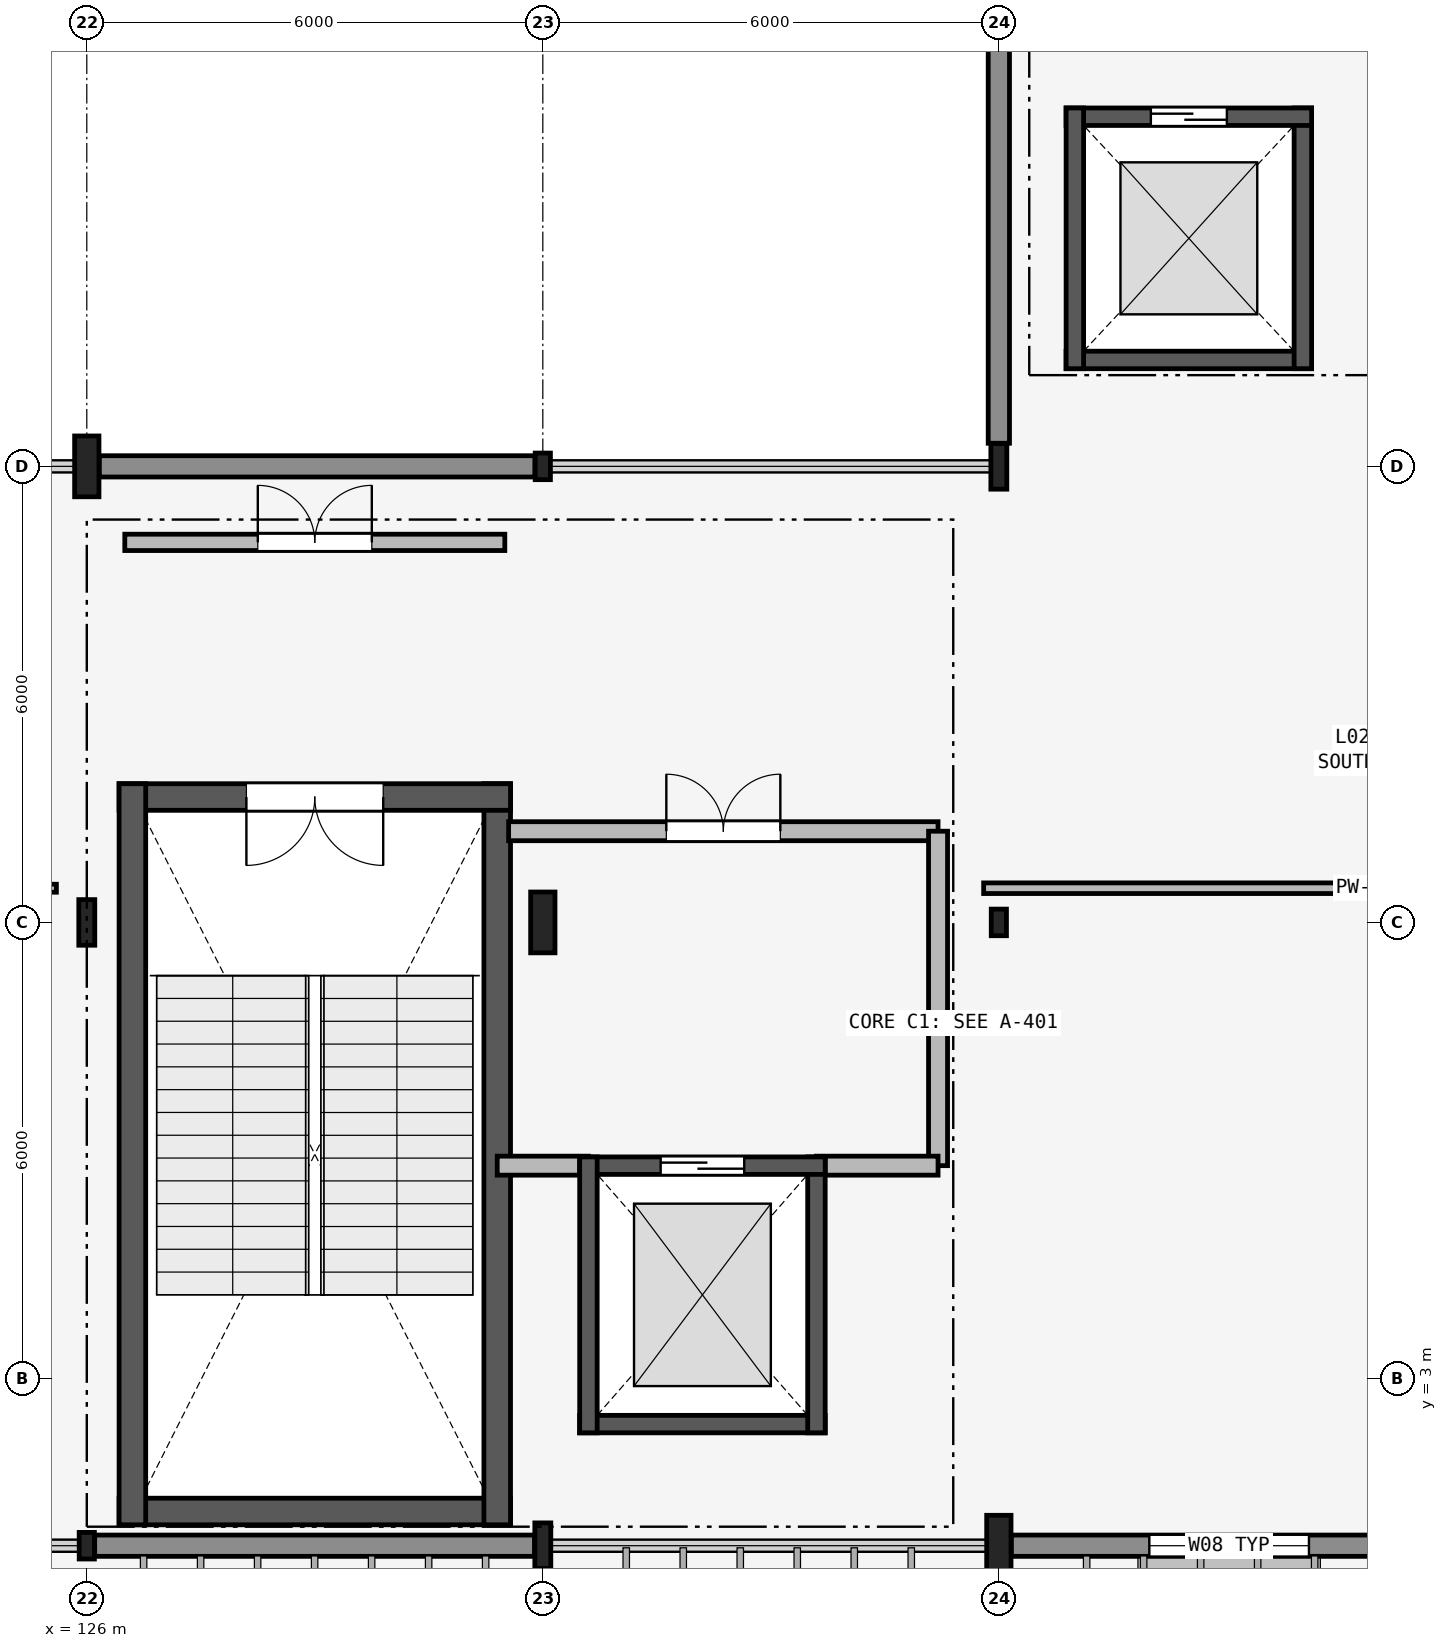
"""IFC4 building model, lengths in metres.
Left out: names, types, materials, properties, quantities, classifications, styles, units other than length and angle.
Written with IfcOpenShell. Run it as: python <this file> out.ifc"""

import sys

from ifc_helpers import new_model, si_unit, direction, frame, frame_2d, origin, origin_2d, place, context, subcontext, project, spatial, rectangle, hollow_rectangle, i_section, extrude, element, fill, save


model = new_model("IFC4")
c1 = context("Model", 3, precision=1e-05, world=origin(), true_north=direction((0.0, 1.0)))
c2 = subcontext(c1, "Body", "Model", "MODEL_VIEW")
j1 = project(units=[si_unit("LENGTHUNIT", "METRE"), si_unit("PLANEANGLEUNIT", "RADIAN")], contexts=[c1])
p1 = place(None, origin())
s1 = spatial("IfcSite", under=j1, at=p1, CompositionType="ELEMENT")
p2 = place(p1, origin())
s2 = spatial("IfcBuilding", under=s1, at=p2, CompositionType="ELEMENT")
p3 = place(p2, frame((0.0, 0.0, 9.3)))
s3 = spatial("IfcBuildingStorey", under=s2, at=p3, CompositionType="ELEMENT", Elevation=9.3)
p4 = place(p3, frame((126.0, 0.8, 0.0), z_axis=(0.0, 0.0, 1.0), x_axis=(1.0, 0.0, 0.0)))
e1 = element("IfcColumn", 1, at=p4, inside=s3, PredefinedType="COLUMN", context=c2, shape_type="SweptSolid", body=[
    extrude(hollow_rectangle(XDim=0.2, YDim=0.35, WallThickness=0.012, InnerFilletRadius=0.012, OuterFilletRadius=0.024, at=origin_2d()), origin(), (0.0, 0.0, 1.0), 4.2),
])
p5 = place(p3, frame((126.0, 9.0, 0.0), z_axis=(0.0, 0.0, 1.0), x_axis=(1.0, 0.0, 0.0)))
e2 = element("IfcColumn", 2, at=p5, inside=s3, PredefinedType="COLUMN", context=c2, shape_type="SweptSolid", body=[
    extrude(i_section(OverallWidth=0.21, OverallDepth=0.6, WebThickness=0.012, FlangeThickness=0.021, FilletRadius=0.02, at=origin_2d()), origin(), (0.0, 0.0, 1.0), 4.2),
])
p6 = place(p3, frame((126.0, 15.0, 0.0), z_axis=(0.0, 0.0, 1.0), x_axis=(1.0, 0.0, 0.0)))
e3 = element("IfcColumn", 3, at=p6, inside=s3, PredefinedType="COLUMN", context=c2, shape_type="SweptSolid", body=[
    extrude(i_section(OverallWidth=0.32, OverallDepth=0.8, WebThickness=0.016, FlangeThickness=0.028, at=origin_2d()), origin(), (0.0, 0.0, 1.0), 4.2),
])
p7 = place(p3, frame((132.0, 0.8, 0.0), z_axis=(0.0, 0.0, 1.0), x_axis=(1.0, 0.0, 0.0)))
e4 = element("IfcColumn", 4, at=p7, inside=s3, PredefinedType="COLUMN", context=c2, shape_type="SweptSolid", body=[
    extrude(i_section(OverallWidth=0.21, OverallDepth=0.6, WebThickness=0.012, FlangeThickness=0.021, FilletRadius=0.02, at=origin_2d()), origin(), (0.0, 0.0, 1.0), 4.2),
])
p8 = place(p3, frame((132.0, 9.0, 0.0), z_axis=(0.0, 0.0, 1.0), x_axis=(1.0, 0.0, 0.0)))
e5 = element("IfcColumn", 5, at=p8, inside=s3, PredefinedType="COLUMN", context=c2, shape_type="SweptSolid", body=[
    extrude(i_section(OverallWidth=0.32, OverallDepth=0.8, WebThickness=0.016, FlangeThickness=0.028, at=origin_2d()), origin(), (0.0, 0.0, 1.0), 4.2),
])
p9 = place(p3, frame((132.0, 15.0, 0.0), z_axis=(0.0, 0.0, 1.0), x_axis=(1.0, 0.0, 0.0)))
e6 = element("IfcColumn", 6, at=p9, inside=s3, PredefinedType="COLUMN", context=c2, shape_type="SweptSolid", body=[
    extrude(hollow_rectangle(XDim=0.2, YDim=0.35, WallThickness=0.012, InnerFilletRadius=0.012, OuterFilletRadius=0.024, at=origin_2d()), origin(), (0.0, 0.0, 1.0), 4.2),
])
p10 = place(p3, frame((138.0, 0.8, 0.0), z_axis=(0.0, 0.0, 1.0), x_axis=(1.0, 0.0, 0.0)))
e7 = element("IfcColumn", 7, at=p10, inside=s3, PredefinedType="COLUMN", context=c2, shape_type="SweptSolid", body=[
    extrude(i_section(OverallWidth=0.32, OverallDepth=0.8, WebThickness=0.016, FlangeThickness=0.028, at=origin_2d()), origin(), (0.0, 0.0, 1.0), 4.2),
])
p11 = place(p3, frame((138.0, 9.0, 0.0), z_axis=(0.0, 0.0, 1.0), x_axis=(1.0, 0.0, 0.0)))
e8 = element("IfcColumn", 8, at=p11, inside=s3, PredefinedType="COLUMN", context=c2, shape_type="SweptSolid", body=[
    extrude(hollow_rectangle(XDim=0.2, YDim=0.35, WallThickness=0.012, InnerFilletRadius=0.012, OuterFilletRadius=0.024, at=origin_2d()), origin(), (0.0, 0.0, 1.0), 4.2),
])
p12 = place(p3, frame((138.0, 15.0, 0.0), z_axis=(0.0, 0.0, 1.0), x_axis=(1.0, 0.0, 0.0)))
e9 = element("IfcColumn", 9, at=p12, inside=s3, PredefinedType="COLUMN", context=c2, shape_type="SweptSolid", body=[
    extrude(i_section(OverallWidth=0.21, OverallDepth=0.6, WebThickness=0.012, FlangeThickness=0.021, FilletRadius=0.02, at=origin_2d()), origin(), (0.0, 0.0, 1.0), 4.2),
])
p13 = place(p3, frame((126.104, 0.8, 0.0), z_axis=(0.0, 0.0, 1.0), x_axis=(1.0, 0.0, 0.0)))
e10 = element("IfcWall", 10, at=p13, inside=s3, PredefinedType="SOLIDWALL", context=c2, shape_type="SweptSolid", body=[
    extrude(rectangle(XDim=5.787, YDim=0.28, at=frame_2d((2.894, 0.0))), origin(), (0.0, 0.0, 1.0), 3.484),
])
p14 = place(p3, frame((138.164, 0.8, 0.0), z_axis=(0.0, 0.0, 1.0), x_axis=(1.0, 0.0, 0.0)))
e11 = element("IfcWall", 11, at=p14, inside=s3, PredefinedType="SOLIDWALL", context=c2, shape_type="SweptSolid", body=[
    extrude(rectangle(XDim=5.732, YDim=0.28, at=frame_2d((2.866, 0.0))), origin(), (0.0, 0.0, 1.0), 3.484),
])
p15 = place(p14, frame((1.816, 0.0, 0.9)))
e12 = element("IfcOpeningElement", 12, at=p15, cuts=e11, PredefinedType="OPENING", context=c2, shape_type="SweptSolid", body=[
    extrude(rectangle(XDim=2.1, YDim=1.5, at=frame_2d((1.05, 0.75))), frame((0.0, 0.15, 0.0), z_axis=(0.0, -1.0, 0.0), x_axis=(1.0, 0.0, 0.0)), (0.0, 0.0, 1.0), 0.3),
])
p16 = place(p3, frame((126.164, 15.0, 0.0), z_axis=(0.0, 0.0, 1.0), x_axis=(1.0, 0.0, 0.0)))
e13 = element("IfcWall", 13, at=p16, inside=s3, PredefinedType="SOLIDWALL", context=c2, shape_type="SweptSolid", body=[
    extrude(rectangle(XDim=5.732, YDim=0.28, at=frame_2d((2.866, 0.0))), origin(), (0.0, 0.0, 1.0), 3.29),
])
p17 = place(p3, frame((138.0, 15.304, 0.0), z_axis=(0.0, 0.0, 1.0), x_axis=(0.0, 1.0, 0.0)))
e14 = element("IfcWall", 14, at=p17, inside=s3, PredefinedType="SOLIDWALL", context=c2, shape_type="SweptSolid", body=[
    extrude(rectangle(XDim=5.292, YDim=0.28, at=frame_2d((2.646, 0.0))), origin(), (0.0, 0.0, 1.0), 3.39),
])
p18 = place(p3, frame((126.425, 1.25, 0.0), z_axis=(0.0, 0.0, 1.0), x_axis=(1.0, 0.0, 0.0)))
e15 = element("IfcWall", 15, at=p18, inside=s3, PredefinedType="SHEAR", context=c2, shape_type="SweptSolid", body=[
    extrude(rectangle(XDim=5.15, YDim=0.35, at=frame_2d((2.575, 0.0))), origin(), (0.0, 0.0, 1.0), 4.06),
])
p19 = place(p3, frame((131.4, 1.075, 0.0), z_axis=(0.0, 0.0, 1.0), x_axis=(0.0, 1.0, 0.0)))
e16 = element("IfcWall", 16, at=p19, inside=s3, PredefinedType="SHEAR", context=c2, shape_type="SweptSolid", body=[
    extrude(rectangle(XDim=9.75, YDim=0.35, at=frame_2d((4.875, 0.0))), origin(), (0.0, 0.0, 1.0), 4.06),
])
p20 = place(p3, frame((131.575, 10.65, 0.0), z_axis=(0.0, 0.0, 1.0), x_axis=(-1.0, 0.0, 0.0)))
e17 = element("IfcWall", 17, at=p20, inside=s3, PredefinedType="SHEAR", context=c2, shape_type="SweptSolid", body=[
    extrude(rectangle(XDim=5.15, YDim=0.35, at=frame_2d((2.575, 0.0))), origin(), (0.0, 0.0, 1.0), 4.06),
])
p21 = place(p20, frame((1.675, 0.0, 0.0)))
e18 = element("IfcOpeningElement", 18, at=p21, cuts=e17, PredefinedType="OPENING", context=c2, shape_type="SweptSolid", body=[
    extrude(rectangle(XDim=1.8, YDim=2.2, at=frame_2d((0.9, 1.1))), frame((0.0, 0.185, 0.0), z_axis=(0.0, -1.0, 0.0), x_axis=(1.0, 0.0, 0.0)), (0.0, 0.0, 1.0), 0.37),
])
p22 = place(p3, frame((126.6, 10.825, 0.0), z_axis=(0.0, 0.0, 1.0), x_axis=(0.0, -1.0, 0.0)))
e19 = element("IfcWall", 19, at=p22, inside=s3, PredefinedType="SHEAR", context=c2, shape_type="SweptSolid", body=[
    extrude(rectangle(XDim=9.75, YDim=0.35, at=frame_2d((4.875, 0.0))), origin(), (0.0, 0.0, 1.0), 4.06),
])
p23 = place(p3, frame((126.5, 14.0, 0.0), z_axis=(0.0, 0.0, 1.0), x_axis=(1.0, 0.0, 0.0)))
e20 = element("IfcWall", 20, at=p23, inside=s3, PredefinedType="PARTITIONING", context=c2, shape_type="SweptSolid", body=[
    extrude(rectangle(XDim=5.0, YDim=0.215, at=frame_2d((2.5, 0.0))), origin(), (0.0, 0.0, 1.0), 3.89),
])
p24 = place(p23, frame((1.75, 0.0, 0.0)))
e21 = element("IfcOpeningElement", 21, at=p24, cuts=e20, PredefinedType="OPENING", context=c2, shape_type="SweptSolid", body=[
    extrude(rectangle(XDim=1.5, YDim=2.15, at=frame_2d((0.75, 1.075))), frame((0.0, 0.117, 0.0), z_axis=(0.0, -1.0, 0.0), x_axis=(1.0, 0.0, 0.0)), (0.0, 0.0, 1.0), 0.235),
])
p25 = place(p3, frame((131.55, 10.2, 0.0), z_axis=(0.0, 0.0, 1.0), x_axis=(1.0, 0.0, 0.0)))
e22 = element("IfcWall", 22, at=p25, inside=s3, PredefinedType="PARTITIONING", context=c2, shape_type="SweptSolid", body=[
    extrude(rectangle(XDim=5.65, YDim=0.25, at=frame_2d((2.825, 0.0))), origin(), (0.0, 0.0, 1.0), 3.566),
])
p26 = place(p25, frame((2.075, 0.0, 0.0)))
e23 = element("IfcOpeningElement", 23, at=p26, cuts=e22, PredefinedType="OPENING", context=c2, shape_type="SweptSolid", body=[
    extrude(rectangle(XDim=1.5, YDim=2.15, at=frame_2d((0.75, 1.075))), frame((0.0, 0.135, 0.0), z_axis=(0.0, -1.0, 0.0), x_axis=(1.0, 0.0, 0.0)), (0.0, 0.0, 1.0), 0.27),
])
p27 = place(p3, frame((137.2, 5.8, 0.0), z_axis=(0.0, 0.0, 1.0), x_axis=(0.0, 1.0, 0.0)))
e24 = element("IfcWall", 24, at=p27, inside=s3, PredefinedType="PARTITIONING", context=c2, shape_type="SweptSolid", body=[
    extrude(rectangle(XDim=4.4, YDim=0.25, at=frame_2d((2.2, 0.0))), origin(), (0.0, 0.0, 1.0), 3.39),
])
p28 = place(p3, frame((135.6, 5.8, 0.0), z_axis=(0.0, 0.0, 1.0), x_axis=(1.0, 0.0, 0.0)))
e25 = element("IfcWall", 25, at=p28, inside=s3, PredefinedType="PARTITIONING", context=c2, shape_type="SweptSolid", body=[
    extrude(rectangle(XDim=1.6, YDim=0.25, at=frame_2d((0.8, 0.0))), origin(), (0.0, 0.0, 1.0), 3.89),
])
p29 = place(p3, frame((131.4, 5.8, 0.0), z_axis=(0.0, 0.0, 1.0), x_axis=(1.0, 0.0, 0.0)))
e26 = element("IfcWall", 26, at=p29, inside=s3, PredefinedType="PARTITIONING", context=c2, shape_type="SweptSolid", body=[
    extrude(rectangle(XDim=1.2, YDim=0.25, at=frame_2d((0.6, 0.0))), origin(), (0.0, 0.0, 1.0), 3.484),
])
p30 = place(p3, frame((132.485, 2.4, 0.0), z_axis=(0.0, 0.0, 1.0), x_axis=(1.0, 0.0, 0.0)))
e27 = element("IfcWall", 27, at=p30, inside=s3, PredefinedType="SHEAR", context=c2, shape_type="SweptSolid", body=[
    extrude(rectangle(XDim=3.23, YDim=0.23, at=frame_2d((1.615, 0.0))), origin(), (0.0, 0.0, 1.0), 4.2),
])
p31 = place(p3, frame((135.6, 2.285, 0.0), z_axis=(0.0, 0.0, 1.0), x_axis=(0.0, 1.0, 0.0)))
e28 = element("IfcWall", 28, at=p31, inside=s3, PredefinedType="SHEAR", context=c2, shape_type="SweptSolid", body=[
    extrude(rectangle(XDim=3.63, YDim=0.23, at=frame_2d((1.815, 0.0))), origin(), (0.0, 0.0, 1.0), 4.2),
])
p32 = place(p3, frame((135.715, 5.8, 0.0), z_axis=(0.0, 0.0, 1.0), x_axis=(-1.0, 0.0, 0.0)))
e29 = element("IfcWall", 29, at=p32, inside=s3, PredefinedType="SHEAR", context=c2, shape_type="SweptSolid", body=[
    extrude(rectangle(XDim=3.23, YDim=0.23, at=frame_2d((1.615, 0.0))), origin(), (0.0, 0.0, 1.0), 4.2),
])
p33 = place(p32, frame((1.065, 0.0, 0.0)))
e30 = element("IfcOpeningElement", 30, at=p33, cuts=e29, PredefinedType="OPENING", context=c2, shape_type="SweptSolid", body=[
    extrude(rectangle(XDim=1.1, YDim=2.2, at=frame_2d((0.55, 1.1))), frame((0.0, 0.125, 0.0), z_axis=(0.0, -1.0, 0.0), x_axis=(1.0, 0.0, 0.0)), (0.0, 0.0, 1.0), 0.25),
])
p34 = place(p3, frame((132.6, 5.915, 0.0), z_axis=(0.0, 0.0, 1.0), x_axis=(0.0, -1.0, 0.0)))
e31 = element("IfcWall", 31, at=p34, inside=s3, PredefinedType="SHEAR", context=c2, shape_type="SweptSolid", body=[
    extrude(rectangle(XDim=3.63, YDim=0.23, at=frame_2d((1.815, 0.0))), origin(), (0.0, 0.0, 1.0), 4.2),
])
p35 = place(p3, frame((138.885, 16.4, 0.0), z_axis=(0.0, 0.0, 1.0), x_axis=(1.0, 0.0, 0.0)))
e32 = element("IfcWall", 32, at=p35, inside=s3, PredefinedType="SHEAR", context=c2, shape_type="SweptSolid", body=[
    extrude(rectangle(XDim=3.23, YDim=0.23, at=frame_2d((1.615, 0.0))), origin(), (0.0, 0.0, 1.0), 4.2),
])
p36 = place(p3, frame((142.0, 16.285, 0.0), z_axis=(0.0, 0.0, 1.0), x_axis=(0.0, 1.0, 0.0)))
e33 = element("IfcWall", 33, at=p36, inside=s3, PredefinedType="SHEAR", context=c2, shape_type="SweptSolid", body=[
    extrude(rectangle(XDim=3.43, YDim=0.23, at=frame_2d((1.715, 0.0))), origin(), (0.0, 0.0, 1.0), 4.2),
])
p37 = place(p3, frame((142.115, 19.6, 0.0), z_axis=(0.0, 0.0, 1.0), x_axis=(-1.0, 0.0, 0.0)))
e34 = element("IfcWall", 34, at=p37, inside=s3, PredefinedType="SHEAR", context=c2, shape_type="SweptSolid", body=[
    extrude(rectangle(XDim=3.23, YDim=0.23, at=frame_2d((1.615, 0.0))), origin(), (0.0, 0.0, 1.0), 4.2),
])
p38 = place(p37, frame((1.115, 0.0, 0.0)))
e35 = element("IfcOpeningElement", 35, at=p38, cuts=e34, PredefinedType="OPENING", context=c2, shape_type="SweptSolid", body=[
    extrude(rectangle(XDim=1.0, YDim=2.15, at=frame_2d((0.5, 1.075))), frame((0.0, 0.125, 0.0), z_axis=(0.0, -1.0, 0.0), x_axis=(1.0, 0.0, 0.0)), (0.0, 0.0, 1.0), 0.25),
])
p39 = place(p3, frame((139.0, 19.715, 0.0), z_axis=(0.0, 0.0, 1.0), x_axis=(0.0, -1.0, 0.0)))
e36 = element("IfcWall", 36, at=p39, inside=s3, PredefinedType="SHEAR", context=c2, shape_type="SweptSolid", body=[
    extrude(rectangle(XDim=3.43, YDim=0.23, at=frame_2d((1.715, 0.0))), origin(), (0.0, 0.0, 1.0), 4.2),
])
p40 = place(p3, frame((108.5, 9.45, 0.0), z_axis=(0.0, 0.0, 1.0), x_axis=(1.0, 0.0, 0.0)))
e37 = element("IfcWall", 37, at=p40, inside=s3, PredefinedType="PARTITIONING", context=c2, shape_type="SweptSolid", body=[
    extrude(rectangle(XDim=17.1, YDim=0.105, at=frame_2d((8.55, 0.0))), origin(), (0.0, 0.0, 1.0), 3.49),
])
p41 = place(p40, frame((8.075, 0.0, 0.0)))
e38 = element("IfcOpeningElement", 38, at=p41, cuts=e37, PredefinedType="OPENING", context=c2, shape_type="SweptSolid", body=[
    extrude(rectangle(XDim=0.95, YDim=2.15, at=frame_2d((0.475, 1.075))), frame((0.0, 0.062, 0.0), z_axis=(0.0, -1.0, 0.0), x_axis=(1.0, 0.0, 0.0)), (0.0, 0.0, 1.0), 0.125),
])
p42 = place(p3, frame((137.8, 9.45, 0.0), z_axis=(0.0, 0.0, 1.0), x_axis=(1.0, 0.0, 0.0)))
e39 = element("IfcWall", 39, at=p42, inside=s3, PredefinedType="PARTITIONING", context=c2, shape_type="SweptSolid", body=[
    extrude(rectangle(XDim=22.8, YDim=0.14, at=frame_2d((11.4, 0.0))), origin(), (0.0, 0.0, 1.0), 3.49),
])
p43 = place(p42, frame((10.425, 0.0, 0.0)))
e40 = element("IfcOpeningElement", 40, at=p43, cuts=e39, PredefinedType="OPENING", context=c2, shape_type="SweptSolid", body=[
    extrude(rectangle(XDim=1.05, YDim=2.2, at=frame_2d((0.525, 1.1))), frame((0.0, 0.08, 0.0), z_axis=(0.0, -1.0, 0.0), x_axis=(1.0, 0.0, 0.0)), (0.0, 0.0, 1.0), 0.16),
])
p44 = place(p15, origin())
e41 = element("IfcWindow", 41, at=p44, inside=s3, PartitioningType="SINGLE_PANEL", PredefinedType="WINDOW", context=c2, shape_type="SweptSolid", body=[
    extrude(rectangle(XDim=2.1, YDim=1.5, at=frame_2d((1.05, 0.75))), frame((0.0, 0.03, 0.0), z_axis=(0.0, -1.0, 0.0), x_axis=(1.0, 0.0, 0.0)), (0.0, 0.0, 1.0), 0.06),
])
fill(e12, e41)
p45 = place(p21, origin())
e42 = element("IfcDoor", 42, at=p45, inside=s3, OperationType="DOUBLE_DOOR_SINGLE_SWING", PredefinedType="DOOR", context=c2, shape_type="SweptSolid", body=[
    extrude(rectangle(XDim=1.8, YDim=2.2, at=frame_2d((0.9, 1.1))), frame((0.0, 0.025, 0.0), z_axis=(0.0, -1.0, 0.0), x_axis=(1.0, 0.0, 0.0)), (0.0, 0.0, 1.0), 0.05),
])
fill(e18, e42)
p46 = place(p24, origin())
e43 = element("IfcDoor", 43, at=p46, inside=s3, OperationType="DOUBLE_DOOR_SINGLE_SWING", PredefinedType="DOOR", context=c2, shape_type="SweptSolid", body=[
    extrude(rectangle(XDim=1.5, YDim=2.15, at=frame_2d((0.75, 1.075))), frame((0.0, 0.025, 0.0), z_axis=(0.0, -1.0, 0.0), x_axis=(1.0, 0.0, 0.0)), (0.0, 0.0, 1.0), 0.05),
])
fill(e21, e43)
p47 = place(p26, origin())
e44 = element("IfcDoor", 44, at=p47, inside=s3, OperationType="DOUBLE_DOOR_SINGLE_SWING", PredefinedType="DOOR", context=c2, shape_type="SweptSolid", body=[
    extrude(rectangle(XDim=1.5, YDim=2.15, at=frame_2d((0.75, 1.075))), frame((0.0, 0.025, 0.0), z_axis=(0.0, -1.0, 0.0), x_axis=(1.0, 0.0, 0.0)), (0.0, 0.0, 1.0), 0.05),
])
fill(e23, e44)
p48 = place(p33, origin())
e45 = element("IfcDoor", 45, at=p48, inside=s3, OperationType="SLIDING_TO_LEFT", PredefinedType="DOOR", context=c2, shape_type="SweptSolid", body=[
    extrude(rectangle(XDim=1.1, YDim=2.2, at=frame_2d((0.55, 1.1))), frame((0.0, 0.025, 0.0), z_axis=(0.0, -1.0, 0.0), x_axis=(1.0, 0.0, 0.0)), (0.0, 0.0, 1.0), 0.05),
])
fill(e30, e45)
p49 = place(p38, origin())
e46 = element("IfcDoor", 46, at=p49, inside=s3, OperationType="SLIDING_TO_LEFT", PredefinedType="DOOR", context=c2, shape_type="SweptSolid", body=[
    extrude(rectangle(XDim=1.0, YDim=2.15, at=frame_2d((0.5, 1.075))), frame((0.0, 0.025, 0.0), z_axis=(0.0, -1.0, 0.0), x_axis=(1.0, 0.0, 0.0)), (0.0, 0.0, 1.0), 0.05),
])
fill(e35, e46)
save(model, sys.argv[1])
